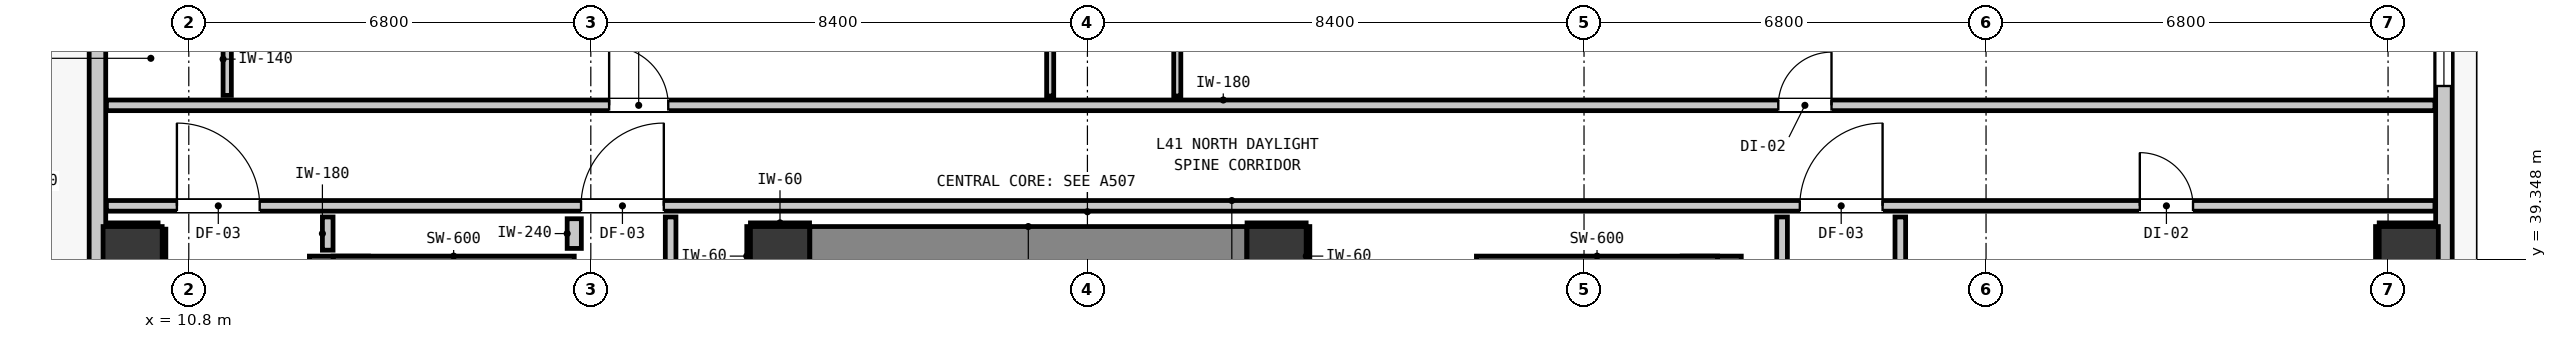
"""IFC4 building model, lengths in metres.
Left out: names, types, materials, properties, quantities, classifications, styles, units other than length and angle.
Written with IfcOpenShell. Run it as: python <this file> out.ifc"""

import sys

from ifc_helpers import new_model, si_unit, direction, frame, frame_2d, origin, origin_2d, place, context, subcontext, project, spatial, rectangle, extrude, element, fill, save


model = new_model("IFC4")
c1 = context("Model", 3, precision=1e-05, world=origin(), true_north=direction((0.0, 1.0)))
c2 = subcontext(c1, "Body", "Model", "MODEL_VIEW")
j1 = project(units=[si_unit("LENGTHUNIT", "METRE"), si_unit("PLANEANGLEUNIT", "RADIAN")], contexts=[c1])
p1 = place(None, origin())
s1 = spatial("IfcSite", under=j1, at=p1, CompositionType="ELEMENT")
p2 = place(p1, origin())
s2 = spatial("IfcBuilding", under=s1, at=p2, CompositionType="ELEMENT")
p3 = place(p2, frame((0.0, 0.0, 142.6)))
s3 = spatial("IfcBuildingStorey", under=s2, at=p3, CompositionType="ELEMENT", Elevation=142.6)
for number, where, z_axis, x_axis in (
    (1, (20.8, 39.4, 0.0), (0.0, 0.0, 1.0), (1.0, 0.0, 0.0)),
    (2, (29.2, 39.4, 0.0), (0.0, 0.0, 1.0), (1.0, 0.0, 0.0)),
):
    element("IfcColumn", number, at=place(p3, frame(where, z_axis=z_axis, x_axis=x_axis)), inside=s3, PredefinedType="COLUMN", context=c2, shape_type="SweptSolid", body=[
        extrude(rectangle(XDim=1.0, YDim=1.0, at=origin_2d()), origin(), (0.0, 0.0, 1.0), 3.32),
    ])
p4 = place(p3, frame((13.34, 31.205, 0.0), z_axis=(0.0, 0.0, 1.0), x_axis=(0.0, 1.0, 0.0)))
e3 = element("IfcWall", 3, at=p4, inside=s3, PredefinedType="SHEAR", context=c2, shape_type="SweptSolid", body=[
    extrude(rectangle(XDim=8.195, YDim=1.0, at=frame_2d((4.097, 0.0))), origin(), (0.0, 0.0, 1.0), 3.32),
])
p5 = place(p3, frame((13.24, 39.1, 0.0), z_axis=(0.0, 0.0, 1.0), x_axis=(1.0, 0.0, 0.0)))
e4 = element("IfcWall", 4, at=p5, inside=s3, PredefinedType="SHEAR", context=c2, shape_type="SweptSolid", body=[
    extrude(rectangle(XDim=4.08, YDim=0.6, at=frame_2d((2.04, 0.0))), origin(), (0.0, 0.0, 1.0), 3.32),
])
p6 = place(p3, frame((36.56, 31.205, 0.0), z_axis=(0.0, 0.0, 1.0), x_axis=(0.0, 1.0, 0.0)))
e5 = element("IfcWall", 5, at=p6, inside=s3, PredefinedType="SHEAR", context=c2, shape_type="SweptSolid", body=[
    extrude(rectangle(XDim=8.195, YDim=1.0, at=frame_2d((4.097, 0.0))), origin(), (0.0, 0.0, 1.0), 3.32),
])
p7 = place(p3, frame((32.58, 39.1, 0.0), z_axis=(0.0, 0.0, 1.0), x_axis=(1.0, 0.0, 0.0)))
e6 = element("IfcWall", 6, at=p7, inside=s3, PredefinedType="SHEAR", context=c2, shape_type="SweptSolid", body=[
    extrude(rectangle(XDim=4.08, YDim=0.6, at=frame_2d((2.04, 0.0))), origin(), (0.0, 0.0, 1.0), 3.32),
])
p8 = place(p3, frame((21.305, 39.4, 0.0), z_axis=(0.0, 0.0, 1.0), x_axis=(1.0, 0.0, 0.0)))
e7 = element("IfcWall", 7, at=p8, inside=s3, PredefinedType="SHEAR", context=c2, shape_type="SweptSolid", body=[
    extrude(rectangle(XDim=7.39, YDim=1.0, at=frame_2d((3.695, 0.0))), origin(), (0.0, 0.0, 1.0), 3.32),
])
for number, where, z_axis, x_axis in (
    (8, (9.85, 39.4, 0.0), (0.0, 0.0, 1.0), (1.0, 0.0, 0.0)),
    (9, (48.35, 39.4, 0.0), (0.0, 0.0, 1.0), (1.0, 0.0, 0.0)),
):
    element("IfcColumn", number, at=place(p3, frame(where, z_axis=z_axis, x_axis=x_axis)), inside=s3, PredefinedType="COLUMN", context=c2, shape_type="SweptSolid", body=[
        extrude(rectangle(XDim=1.0, YDim=1.0, at=origin_2d()), origin(), (0.0, 0.0, 1.0), 2.9),
    ])
p9 = place(p3, frame((9.255, 11.355, 0.0), z_axis=(0.0, 0.0, 1.0), x_axis=(0.0, 1.0, 0.0)))
e10 = element("IfcWall", 10, at=p9, inside=s3, PredefinedType="STANDARD", context=c2, shape_type="SweptSolid", body=[
    extrude(rectangle(XDim=32.29, YDim=0.28, at=frame_2d((16.145, 0.0))), origin(), (0.0, 0.0, 1.0), 2.9),
])
p10 = place(p9, frame((5.818, 0.0, 0.0)))
e11 = element("IfcOpeningElement", 11, at=p10, cuts=e10, PredefinedType="OPENING", context=c2, shape_type="SweptSolid", body=[
    extrude(rectangle(XDim=1.0, YDim=2.15, at=frame_2d((0.5, 1.075))), frame((0.0, 0.15, 0.0), z_axis=(0.0, -1.0, 0.0), x_axis=(1.0, 0.0, 0.0)), (0.0, 0.0, 1.0), 0.3),
])
p11 = place(p9, frame((0.544, 0.0, 0.85)))
e12 = element("IfcOpeningElement", 12, at=p11, cuts=e10, PredefinedType="OPENING", context=c2, shape_type="SweptSolid", body=[
    extrude(rectangle(XDim=1.05, YDim=1.65, at=frame_2d((0.525, 0.825))), frame((0.0, 0.15, 0.0), z_axis=(0.0, -1.0, 0.0), x_axis=(1.0, 0.0, 0.0)), (0.0, 0.0, 1.0), 0.3),
])
p12 = place(p3, frame((48.945, 43.645, 0.0), z_axis=(0.0, 0.0, 1.0), x_axis=(0.0, -1.0, 0.0)))
e13 = element("IfcWall", 13, at=p12, inside=s3, PredefinedType="STANDARD", context=c2, shape_type="SweptSolid", body=[
    extrude(rectangle(XDim=32.29, YDim=0.28, at=frame_2d((16.145, 0.0))), origin(), (0.0, 0.0, 1.0), 2.9),
])
p13 = place(p12, frame((5.467, 0.0, 0.0)))
e14 = element("IfcOpeningElement", 14, at=p13, cuts=e13, PredefinedType="OPENING", context=c2, shape_type="SweptSolid", body=[
    extrude(rectangle(XDim=1.0, YDim=2.15, at=frame_2d((0.5, 1.075))), frame((0.0, 0.15, 0.0), z_axis=(0.0, -1.0, 0.0), x_axis=(1.0, 0.0, 0.0)), (0.0, 0.0, 1.0), 0.3),
])
p14 = place(p12, frame((29.073, 0.0, 0.85)))
e15 = element("IfcOpeningElement", 15, at=p14, cuts=e13, PredefinedType="OPENING", context=c2, shape_type="SweptSolid", body=[
    extrude(rectangle(XDim=1.05, YDim=1.65, at=frame_2d((0.525, 0.825))), frame((0.0, 0.15, 0.0), z_axis=(0.0, -1.0, 0.0), x_axis=(1.0, 0.0, 0.0)), (0.0, 0.0, 1.0), 0.3),
])
p15 = place(p12, frame((0.318, 0.0, 0.85)))
e16 = element("IfcOpeningElement", 16, at=p15, cuts=e13, PredefinedType="OPENING", context=c2, shape_type="SweptSolid", body=[
    extrude(rectangle(XDim=1.05, YDim=1.65, at=frame_2d((0.525, 0.825))), frame((0.0, 0.15, 0.0), z_axis=(0.0, -1.0, 0.0), x_axis=(1.0, 0.0, 0.0)), (0.0, 0.0, 1.0), 0.3),
])
p16 = place(p12, frame((16.201, 0.0, 0.85)))
e17 = element("IfcOpeningElement", 17, at=p16, cuts=e13, PredefinedType="OPENING", context=c2, shape_type="SweptSolid", body=[
    extrude(rectangle(XDim=1.05, YDim=1.65, at=frame_2d((0.525, 0.825))), frame((0.0, 0.15, 0.0), z_axis=(0.0, -1.0, 0.0), x_axis=(1.0, 0.0, 0.0)), (0.0, 0.0, 1.0), 0.3),
])
p17 = place(p12, frame((10.57, 0.0, 0.85)))
e18 = element("IfcOpeningElement", 18, at=p17, cuts=e13, PredefinedType="OPENING", context=c2, shape_type="SweptSolid", body=[
    extrude(rectangle(XDim=1.05, YDim=1.65, at=frame_2d((0.525, 0.825))), frame((0.0, 0.15, 0.0), z_axis=(0.0, -1.0, 0.0), x_axis=(1.0, 0.0, 0.0)), (0.0, 0.0, 1.0), 0.3),
])
p18 = place(p3, frame((9.407, 40.25, 0.0), z_axis=(0.0, 0.0, 1.0), x_axis=(1.0, 0.0, 0.0)))
e19 = element("IfcWall", 19, at=p18, inside=s3, PredefinedType="PARTITIONING", context=c2, shape_type="SweptSolid", body=[
    extrude(rectangle(XDim=39.386, YDim=0.18, at=frame_2d((19.693, 0.0))), origin(), (0.0, 0.0, 1.0), 2.9),
])
p19 = place(p18, frame((8.028, 0.0, 0.0)))
e20 = element("IfcOpeningElement", 20, at=p19, cuts=e19, PredefinedType="OPENING", context=c2, shape_type="SweptSolid", body=[
    extrude(rectangle(XDim=1.4, YDim=2.15, at=frame_2d((0.7, 1.075))), frame((0.0, 0.1, 0.0), z_axis=(0.0, -1.0, 0.0), x_axis=(1.0, 0.0, 0.0)), (0.0, 0.0, 1.0), 0.2),
])
p20 = place(p18, frame((1.192, 0.0, 0.0)))
e21 = element("IfcOpeningElement", 21, at=p20, cuts=e19, PredefinedType="OPENING", context=c2, shape_type="SweptSolid", body=[
    extrude(rectangle(XDim=1.4, YDim=2.15, at=frame_2d((0.7, 1.075))), frame((0.0, 0.1, 0.0), z_axis=(0.0, -1.0, 0.0), x_axis=(1.0, 0.0, 0.0)), (0.0, 0.0, 1.0), 0.2),
])
p21 = place(p18, frame((28.643, 0.0, 0.0)))
e22 = element("IfcOpeningElement", 22, at=p21, cuts=e19, PredefinedType="OPENING", context=c2, shape_type="SweptSolid", body=[
    extrude(rectangle(XDim=1.4, YDim=2.15, at=frame_2d((0.7, 1.075))), frame((0.0, 0.1, 0.0), z_axis=(0.0, -1.0, 0.0), x_axis=(1.0, 0.0, 0.0)), (0.0, 0.0, 1.0), 0.2),
])
p22 = place(p18, frame((34.394, 0.0, 0.0)))
e23 = element("IfcOpeningElement", 23, at=p22, cuts=e19, PredefinedType="OPENING", context=c2, shape_type="SweptSolid", body=[
    extrude(rectangle(XDim=0.9, YDim=2.1, at=frame_2d((0.45, 1.05))), frame((0.0, 0.1, 0.0), z_axis=(0.0, -1.0, 0.0), x_axis=(1.0, 0.0, 0.0)), (0.0, 0.0, 1.0), 0.2),
])
p23 = place(p3, frame((9.407, 41.95, 0.0), z_axis=(0.0, 0.0, 1.0), x_axis=(1.0, 0.0, 0.0)))
e24 = element("IfcWall", 24, at=p23, inside=s3, PredefinedType="PARTITIONING", context=c2, shape_type="SweptSolid", body=[
    extrude(rectangle(XDim=39.386, YDim=0.18, at=frame_2d((19.693, 0.0))), origin(), (0.0, 0.0, 1.0), 2.9),
])
p24 = place(p23, frame((8.503, 0.0, 0.0)))
e25 = element("IfcOpeningElement", 25, at=p24, cuts=e24, PredefinedType="OPENING", context=c2, shape_type="SweptSolid", body=[
    extrude(rectangle(XDim=1.0, YDim=2.15, at=frame_2d((0.5, 1.075))), frame((0.0, 0.1, 0.0), z_axis=(0.0, -1.0, 0.0), x_axis=(1.0, 0.0, 0.0)), (0.0, 0.0, 1.0), 0.2),
])
p25 = place(p23, frame((28.279, 0.0, 0.0)))
e26 = element("IfcOpeningElement", 26, at=p25, cuts=e24, PredefinedType="OPENING", context=c2, shape_type="SweptSolid", body=[
    extrude(rectangle(XDim=0.9, YDim=2.1, at=frame_2d((0.45, 1.05))), frame((0.0, 0.1, 0.0), z_axis=(0.0, -1.0, 0.0), x_axis=(1.0, 0.0, 0.0)), (0.0, 0.0, 1.0), 0.2),
])
p26 = place(p3, frame((17.32, 39.53, 0.0), z_axis=(0.0, 0.0, 1.0), x_axis=(0.0, 1.0, 0.0)))
e27 = element("IfcWall", 27, at=p26, inside=s3, PredefinedType="PARTITIONING", context=c2, shape_type="SweptSolid", body=[
    extrude(rectangle(XDim=0.502, YDim=0.24, at=frame_2d((0.251, 0.0))), origin(), (0.0, 0.0, 1.0), 2.9),
])
p27 = place(p3, frame((13.15, 39.5, 0.0), z_axis=(0.0, 0.0, 1.0), x_axis=(0.0, 1.0, 0.0)))
e28 = element("IfcWall", 28, at=p27, inside=s3, PredefinedType="PARTITIONING", context=c2, shape_type="SweptSolid", body=[
    extrude(rectangle(XDim=0.562, YDim=0.18, at=frame_2d((0.281, 0.0))), origin(), (0.0, 0.0, 1.0), 0.905),
])
p28 = place(p3, frame((18.95, 39.058, 0.0), z_axis=(0.0, 0.0, 1.0), x_axis=(0.0, 1.0, 0.0)))
e29 = element("IfcWall", 29, at=p28, inside=s3, PredefinedType="PARTITIONING", context=c2, shape_type="SweptSolid", body=[
    extrude(rectangle(XDim=1.004, YDim=0.18, at=frame_2d((0.502, 0.0))), origin(), (0.0, 0.0, 1.0), 2.9),
])
p29 = place(p3, frame((37.75, 21.368, 0.0), z_axis=(0.0, 0.0, 1.0), x_axis=(0.0, 1.0, 0.0)))
e30 = element("IfcWall", 30, at=p29, inside=s3, PredefinedType="PARTITIONING", context=c2, shape_type="SweptSolid", body=[
    extrude(rectangle(XDim=18.694, YDim=0.18, at=frame_2d((9.347, 0.0))), origin(), (0.0, 0.0, 1.0), 2.9),
])
p30 = place(p3, frame((39.75, 34.168, 0.0), z_axis=(0.0, 0.0, 1.0), x_axis=(0.0, 1.0, 0.0)))
e31 = element("IfcWall", 31, at=p30, inside=s3, PredefinedType="PARTITIONING", context=c2, shape_type="SweptSolid", body=[
    extrude(rectangle(XDim=5.894, YDim=0.18, at=frame_2d((2.947, 0.0))), origin(), (0.0, 0.0, 1.0), 2.9),
])
p31 = place(p3, frame((11.45, 42.118, 0.0), z_axis=(0.0, 0.0, 1.0), x_axis=(0.0, 1.0, 0.0)))
e32 = element("IfcWall", 32, at=p31, inside=s3, PredefinedType="PARTITIONING", context=c2, shape_type="SweptSolid", body=[
    extrude(rectangle(XDim=3.507, YDim=0.14, at=frame_2d((1.753, 0.0))), origin(), (0.0, 0.0, 1.0), 2.9),
])
p32 = place(p31, frame((1.327, 0.0, 0.0)))
e33 = element("IfcOpeningElement", 33, at=p32, cuts=e32, PredefinedType="OPENING", context=c2, shape_type="SweptSolid", body=[
    extrude(rectangle(XDim=0.86, YDim=2.02, at=frame_2d((0.43, 1.01))), frame((0.0, 0.08, 0.0), z_axis=(0.0, -1.0, 0.0), x_axis=(1.0, 0.0, 0.0)), (0.0, 0.0, 1.0), 0.16),
])
p33 = place(p3, frame((25.37, 42.108, 0.0), z_axis=(0.0, 0.0, 1.0), x_axis=(0.0, 1.0, 0.0)))
e34 = element("IfcWall", 34, at=p33, inside=s3, PredefinedType="PARTITIONING", context=c2, shape_type="SweptSolid", body=[
    extrude(rectangle(XDim=3.685, YDim=0.12, at=frame_2d((1.843, 0.0))), origin(), (0.0, 0.0, 1.0), 2.9),
])
p34 = place(p33, frame((1.317, 0.0, 0.0)))
e35 = element("IfcOpeningElement", 35, at=p34, cuts=e34, PredefinedType="OPENING", context=c2, shape_type="SweptSolid", body=[
    extrude(rectangle(XDim=0.9, YDim=2.1, at=frame_2d((0.45, 1.05))), frame((0.0, 0.07, 0.0), z_axis=(0.0, -1.0, 0.0), x_axis=(1.0, 0.0, 0.0)), (0.0, 0.0, 1.0), 0.14),
])
p35 = place(p3, frame((27.52, 42.108, 0.0), z_axis=(0.0, 0.0, 1.0), x_axis=(0.0, 1.0, 0.0)))
e36 = element("IfcWall", 36, at=p35, inside=s3, PredefinedType="PARTITIONING", context=c2, shape_type="SweptSolid", body=[
    extrude(rectangle(XDim=3.685, YDim=0.12, at=frame_2d((1.843, 0.0))), origin(), (0.0, 0.0, 1.0), 2.9),
])
for number, where, z_axis, x_axis in (
    (37, (20.3, 39.932, 0.0), (0.0, 0.0, 1.0), (1.0, 0.0, 0.0)),
    (38, (20.268, 38.9, 0.0), (0.0, 0.0, 1.0), (0.0, 1.0, 0.0)),
    (39, (28.7, 39.932, 0.0), (0.0, 0.0, 1.0), (1.0, 0.0, 0.0)),
    (40, (29.732, 38.9, 0.0), (0.0, 0.0, 1.0), (0.0, 1.0, 0.0)),
):
    element("IfcWall", number, at=place(p3, frame(where, z_axis=z_axis, x_axis=x_axis)), inside=s3, PredefinedType="PARTITIONING", context=c2, shape_type="SweptSolid", body=[
        extrude(rectangle(XDim=1.0, YDim=0.06, at=frame_2d((0.5, 0.0))), origin(), (0.0, 0.0, 1.0), 0.905),
    ])
p36 = place(p3, frame((9.41, 39.932, 0.0), z_axis=(0.0, 0.0, 1.0), x_axis=(1.0, 0.0, 0.0)))
e41 = element("IfcWall", 41, at=p36, inside=s3, PredefinedType="PARTITIONING", context=c2, shape_type="SweptSolid", body=[
    extrude(rectangle(XDim=0.871, YDim=0.06, at=frame_2d((0.436, 0.0))), origin(), (0.0, 0.0, 1.0), 0.905),
])
p37 = place(p3, frame((10.382, 38.9, 0.0), z_axis=(0.0, 0.0, 1.0), x_axis=(0.0, 1.0, 0.0)))
e42 = element("IfcWall", 42, at=p37, inside=s3, PredefinedType="PARTITIONING", context=c2, shape_type="SweptSolid", body=[
    extrude(rectangle(XDim=0.956, YDim=0.06, at=frame_2d((0.478, 0.0))), origin(), (0.0, 0.0, 1.0), 1.45),
])
p38 = place(p3, frame((47.85, 39.932, 0.0), z_axis=(0.0, 0.0, 1.0), x_axis=(1.0, 0.0, 0.0)))
e43 = element("IfcWall", 43, at=p38, inside=s3, PredefinedType="PARTITIONING", context=c2, shape_type="SweptSolid", body=[
    extrude(rectangle(XDim=0.94, YDim=0.06, at=frame_2d((0.47, 0.0))), origin(), (0.0, 0.0, 1.0), 0.905),
])
p39 = place(p3, frame((47.818, 38.9, 0.0), z_axis=(0.0, 0.0, 1.0), x_axis=(0.0, 1.0, 0.0)))
e44 = element("IfcWall", 44, at=p39, inside=s3, PredefinedType="PARTITIONING", context=c2, shape_type="SweptSolid", body=[
    extrude(rectangle(XDim=1.0, YDim=0.06, at=frame_2d((0.5, 0.0))), origin(), (0.0, 0.0, 1.0), 1.45),
])
p40 = place(p15, origin())
e45 = element("IfcWindow", 45, at=p40, inside=s3, PartitioningType="SINGLE_PANEL", PredefinedType="WINDOW", context=c2, shape_type="SweptSolid", body=[
    extrude(rectangle(XDim=1.05, YDim=1.65, at=frame_2d((0.525, 0.825))), frame((0.0, 0.03, 0.0), z_axis=(0.0, -1.0, 0.0), x_axis=(1.0, 0.0, 0.0)), (0.0, 0.0, 1.0), 0.06),
])
fill(e16, e45)
p41 = place(p19, origin())
e46 = element("IfcDoor", 46, at=p41, inside=s3, OperationType="SINGLE_SWING_RIGHT", PredefinedType="DOOR", context=c2, shape_type="SweptSolid", body=[
    extrude(rectangle(XDim=1.4, YDim=2.15, at=frame_2d((0.7, 1.075))), frame((0.0, 0.025, 0.0), z_axis=(0.0, -1.0, 0.0), x_axis=(1.0, 0.0, 0.0)), (0.0, 0.0, 1.0), 0.05),
])
fill(e20, e46)
p42 = place(p20, origin())
e47 = element("IfcDoor", 47, at=p42, inside=s3, OperationType="SINGLE_SWING_LEFT", PredefinedType="DOOR", context=c2, shape_type="SweptSolid", body=[
    extrude(rectangle(XDim=1.4, YDim=2.15, at=frame_2d((0.7, 1.075))), frame((0.0, 0.025, 0.0), z_axis=(0.0, -1.0, 0.0), x_axis=(1.0, 0.0, 0.0)), (0.0, 0.0, 1.0), 0.05),
])
fill(e21, e47)
p43 = place(p21, origin())
e48 = element("IfcDoor", 48, at=p43, inside=s3, OperationType="SINGLE_SWING_RIGHT", PredefinedType="DOOR", context=c2, shape_type="SweptSolid", body=[
    extrude(rectangle(XDim=1.4, YDim=2.15, at=frame_2d((0.7, 1.075))), frame((0.0, 0.025, 0.0), z_axis=(0.0, -1.0, 0.0), x_axis=(1.0, 0.0, 0.0)), (0.0, 0.0, 1.0), 0.05),
])
fill(e22, e48)
p44 = place(p24, origin())
e49 = element("IfcDoor", 49, at=p44, inside=s3, OperationType="SINGLE_SWING_LEFT", PredefinedType="DOOR", context=c2, shape_type="SweptSolid", body=[
    extrude(rectangle(XDim=1.0, YDim=2.15, at=frame_2d((0.5, 1.075))), frame((0.0, 0.025, 0.0), z_axis=(0.0, -1.0, 0.0), x_axis=(1.0, 0.0, 0.0)), (0.0, 0.0, 1.0), 0.05),
])
fill(e25, e49)
p45 = place(p25, origin())
e50 = element("IfcDoor", 50, at=p45, inside=s3, OperationType="SINGLE_SWING_RIGHT", PredefinedType="DOOR", context=c2, shape_type="SweptSolid", body=[
    extrude(rectangle(XDim=0.9, YDim=2.1, at=frame_2d((0.45, 1.05))), frame((0.0, 0.025, 0.0), z_axis=(0.0, -1.0, 0.0), x_axis=(1.0, 0.0, 0.0)), (0.0, 0.0, 1.0), 0.05),
])
fill(e26, e50)
p46 = place(p22, origin())
e51 = element("IfcDoor", 51, at=p46, inside=s3, OperationType="SINGLE_SWING_LEFT", PredefinedType="DOOR", context=c2, shape_type="SweptSolid", body=[
    extrude(rectangle(XDim=0.9, YDim=2.1, at=frame_2d((0.45, 1.05))), frame((0.0, 0.025, 0.0), z_axis=(0.0, -1.0, 0.0), x_axis=(1.0, 0.0, 0.0)), (0.0, 0.0, 1.0), 0.05),
])
fill(e23, e51)
save(model, sys.argv[1])
